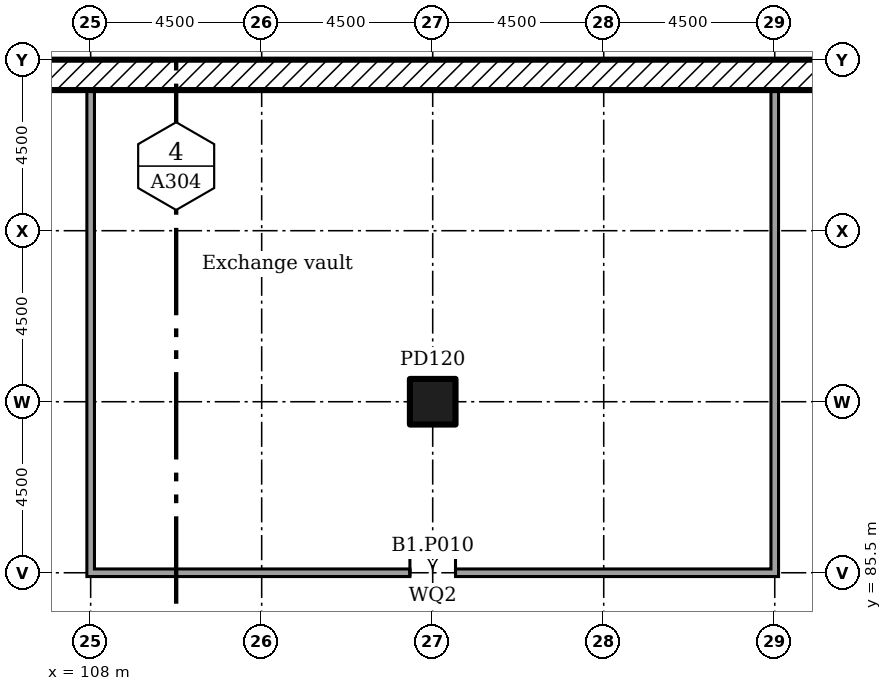
"""IFC4 building model, lengths in metres.
Left out: names, types, materials, properties, quantities, classifications, styles, units other than length and angle.
Written with IfcOpenShell. Run it as: python <this file> out.ifc"""

import sys

from ifc_helpers import new_model, si_unit, direction, frame, frame_2d, origin, origin_2d, place, context, subcontext, project, spatial, rectangle, extrude, element, fill, save


model = new_model("IFC4")
c1 = context("Model", 3, precision=1e-05, world=origin(), true_north=direction((0.0, 1.0)))
c2 = subcontext(c1, "Body", "Model", "MODEL_VIEW")
j1 = project(units=[si_unit("LENGTHUNIT", "METRE"), si_unit("PLANEANGLEUNIT", "RADIAN")], contexts=[c1])
p1 = place(None, origin())
s1 = spatial("IfcSite", under=j1, at=p1, CompositionType="ELEMENT")
p2 = place(p1, origin())
s2 = spatial("IfcBuilding", under=s1, at=p2, CompositionType="ELEMENT")
p3 = place(p2, frame((0.0, 0.0, -4.0)))
s3 = spatial("IfcBuildingStorey", under=s2, at=p3, CompositionType="ELEMENT", Elevation=-4.0)
p4 = place(p3, frame((117.0, 90.0, 0.0)))
e1 = element("IfcColumn", 1, at=p4, inside=s3, PredefinedType="COLUMN", context=c2, shape_type="SweptSolid", body=[
    extrude(rectangle(XDim=1.2, YDim=1.2, at=origin_2d()), origin(), (0.0, 0.0, 1.0), 4.0),
])
p5 = place(p3, frame((0.0, 98.6, 0.0)))
e2 = element("IfcWall", 2, at=p5, inside=s3, PredefinedType="SOLIDWALL", context=c2, shape_type="SweptSolid", body=[
    extrude(rectangle(XDim=153.0, YDim=0.8, at=frame_2d((76.5, 0.0))), origin(), (0.0, 0.0, 1.0), 4.0),
])
for number, where, z_axis, x_axis in (
    (3, (108.0, 85.4, 0.0), (0.0, 0.0, 1.0), (0.0, 1.0, 0.0)),
    (4, (126.0, 85.4, 0.0), (0.0, 0.0, 1.0), (0.0, 1.0, 0.0)),
):
    element("IfcWall", number, at=place(p3, frame(where, z_axis=z_axis, x_axis=x_axis)), inside=s3, PredefinedType="SOLIDWALL", context=c2, shape_type="SweptSolid", body=[
        extrude(rectangle(XDim=12.8, YDim=0.2, at=frame_2d((6.4, 0.0))), origin(), (0.0, 0.0, 1.0), 3.55),
    ])
p6 = place(p3, frame((108.1, 85.5, 0.0)))
e5 = element("IfcWall", 5, at=p6, inside=s3, PredefinedType="SOLIDWALL", context=c2, shape_type="SweptSolid", body=[
    extrude(rectangle(XDim=17.8, YDim=0.2, at=frame_2d((8.9, 0.0))), origin(), (0.0, 0.0, 1.0), 3.55),
])
p7 = place(p6, frame((8.3, 0.0, 0.0)))
e6 = element("IfcOpeningElement", 6, at=p7, cuts=e5, PredefinedType="OPENING", context=c2, shape_type="SweptSolid", body=[
    extrude(rectangle(XDim=1.2, YDim=2.1, at=frame_2d((0.6, 1.05))), frame((0.0, 0.11, 0.0), z_axis=(0.0, -1.0, 0.0), x_axis=(1.0, 0.0, 0.0)), (0.0, 0.0, 1.0), 0.22),
])
p8 = place(p7, origin())
e7 = element("IfcDoor", 7, at=p8, inside=s3, OperationType="DOUBLE_DOOR_SINGLE_SWING", PredefinedType="DOOR", context=c2, shape_type="SweptSolid", body=[
    extrude(rectangle(XDim=1.2, YDim=2.1, at=frame_2d((0.6, 1.05))), frame((0.0, 0.025, 0.0), z_axis=(0.0, -1.0, 0.0), x_axis=(1.0, 0.0, 0.0)), (0.0, 0.0, 1.0), 0.05),
])
fill(e6, e7)
save(model, sys.argv[1])
